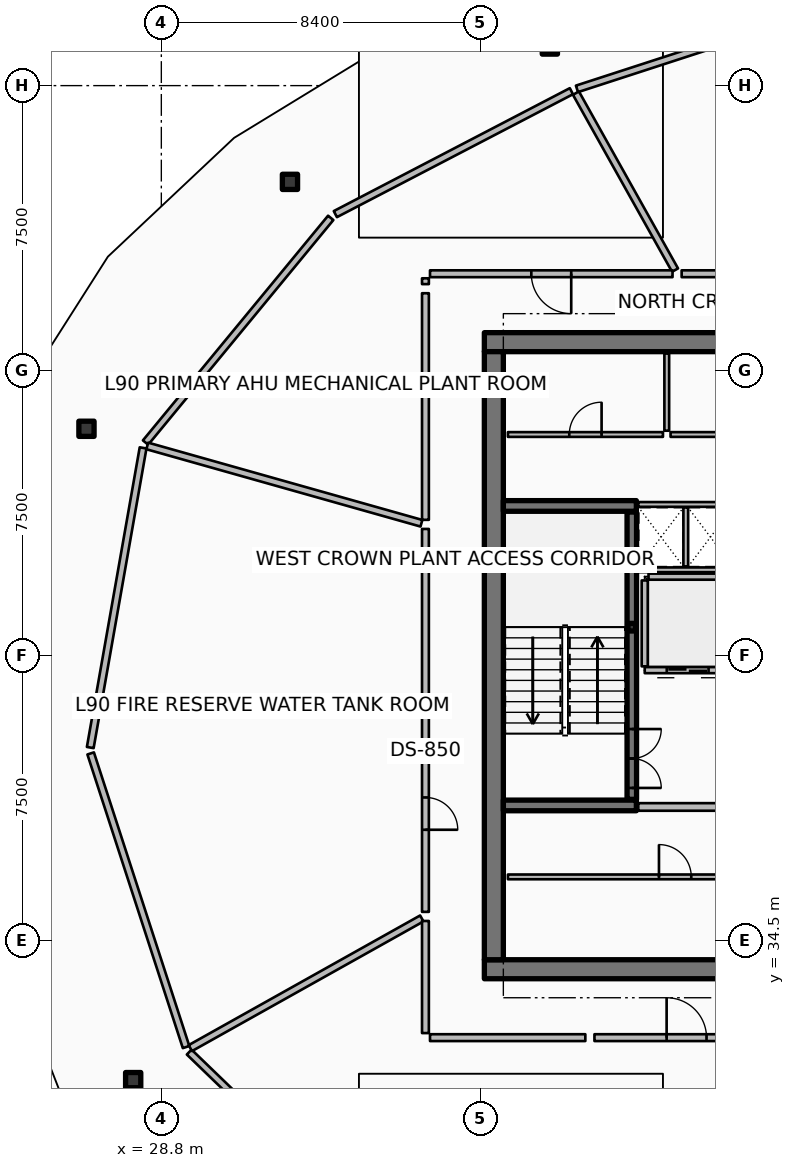
"""IFC4 building model, lengths in metres.
Left out: names, types, materials, properties, quantities, classifications, styles, units other than length and angle.
Written with IfcOpenShell. Run it as: python <this file> out.ifc"""

import sys

from ifc_helpers import new_model, si_unit, direction, frame, frame_2d, origin, origin_2d, place, context, subcontext, project, spatial, rectangle, hollow_rectangle, extrude, element, fill, save


model = new_model("IFC4")
c1 = context("Model", 3, precision=1e-05, world=origin(), true_north=direction((0.0, 1.0)))
c2 = subcontext(c1, "Body", "Model", "MODEL_VIEW")
j1 = project(units=[si_unit("LENGTHUNIT", "METRE"), si_unit("PLANEANGLEUNIT", "RADIAN")], contexts=[c1])
p1 = place(None, origin())
s1 = spatial("IfcSite", under=j1, at=p1, CompositionType="ELEMENT")
p2 = place(p1, origin())
s2 = spatial("IfcBuilding", under=s1, at=p2, CompositionType="ELEMENT")
p3 = place(p2, frame((0.0, 0.0, 359.6)))
s3 = spatial("IfcBuildingStorey", under=s2, at=p3, CompositionType="ELEMENT", Elevation=359.6)
for number, where, z_axis, x_axis in (
    (1, (37.3, 33.75, 0.0), (0.0, 0.0, 1.0), (1.0, 0.0, 0.0)),
    (2, (37.3, 50.25, 0.0), (0.0, 0.0, 1.0), (1.0, 0.0, 0.0)),
):
    element("IfcWall", number, at=place(p3, frame(where, z_axis=z_axis, x_axis=x_axis)), inside=s3, PredefinedType="SHEAR", context=c2, shape_type="SweptSolid", body=[
        extrude(rectangle(XDim=9.6, YDim=0.5, at=frame_2d((4.8, 0.0))), origin(), (0.0, 0.0, 1.0), 3.6),
    ])
p4 = place(p3, frame((37.55, 34.0, 0.0), z_axis=(0.0, 0.0, 1.0), x_axis=(0.0, 1.0, 0.0)))
e3 = element("IfcWall", 3, at=p4, inside=s3, PredefinedType="SHEAR", context=c2, shape_type="SweptSolid", body=[
    extrude(rectangle(XDim=16.0, YDim=0.5, at=frame_2d((8.0, 0.0))), origin(), (0.0, 0.0, 1.0), 3.6),
])
for number, where, z_axis, x_axis in (
    (4, (37.8, 38.06, 0.0), (0.0, 0.0, 1.0), (1.0, 0.0, 0.0)),
    (5, (37.8, 45.94, 0.0), (0.0, 0.0, 1.0), (1.0, 0.0, 0.0)),
):
    element("IfcWall", number, at=place(p3, frame(where, z_axis=z_axis, x_axis=x_axis)), inside=s3, PredefinedType="SHEAR", context=c2, shape_type="SweptSolid", body=[
        extrude(rectangle(XDim=3.5, YDim=0.28, at=frame_2d((1.75, 0.0))), origin(), (0.0, 0.0, 1.0), 3.6),
    ])
p5 = place(p3, frame((41.18, 42.75, 0.0), z_axis=(0.0, 0.0, 1.0), x_axis=(1.0, 0.0, 0.0)))
e6 = element("IfcColumn", 6, at=p5, inside=s3, PredefinedType="COLUMN", context=c2, shape_type="SweptSolid", body=[
    extrude(hollow_rectangle(XDim=0.2, YDim=0.2, WallThickness=0.01, InnerFilletRadius=0.01, OuterFilletRadius=0.02, at=origin_2d()), origin(), (0.0, 0.0, 1.0), 1.595),
])
for number, where, z_axis, x_axis in (
    (7, (39.023, 58.029, 0.0), (0.0, 0.0, 1.0), (1.0, 0.0, 0.0)),
    (8, (32.185, 54.468, 0.0), (0.0, 0.0, 1.0), (1.0, 0.0, 0.0)),
    (9, (26.83, 47.97, 0.0), (0.0, 0.0, 1.0), (1.0, 0.0, 0.0)),
    (10, (28.059, 30.833, 0.0), (0.0, 0.0, 1.0), (1.0, 0.0, 0.0)),
):
    element("IfcColumn", number, at=place(p3, frame(where, z_axis=z_axis, x_axis=x_axis)), inside=s3, PredefinedType="COLUMN", context=c2, shape_type="SweptSolid", body=[
        extrude(hollow_rectangle(XDim=0.4, YDim=0.4, WallThickness=0.02, InnerFilletRadius=0.02, OuterFilletRadius=0.04, at=origin_2d()), origin(), (0.0, 0.0, 1.0), 3.32),
    ])
p6 = place(p3, frame((41.18, 38.22, 0.0), z_axis=(0.0, 0.0, 1.0), x_axis=(0.0, 1.0, 0.0)))
e11 = element("IfcWall", 11, at=p6, inside=s3, PredefinedType="SOLIDWALL", context=c2, shape_type="SweptSolid", body=[
    extrude(rectangle(XDim=7.56, YDim=0.25, at=frame_2d((3.78, 0.0))), origin(), (0.0, 0.0, 1.0), 3.32),
])
p7 = place(p6, frame((0.3, 0.0, 0.0)))
e12 = element("IfcOpeningElement", 12, at=p7, cuts=e11, PredefinedType="OPENING", context=c2, shape_type="SweptSolid", body=[
    extrude(rectangle(XDim=1.55, YDim=2.15, at=frame_2d((0.775, 1.075))), frame((0.0, 0.135, 0.0), z_axis=(0.0, -1.0, 0.0), x_axis=(1.0, 0.0, 0.0)), (0.0, 0.0, 1.0), 0.27),
])
p8 = place(p3, frame((43.78, 41.62, 0.0), z_axis=(0.0, 0.0, 1.0), x_axis=(-1.0, 0.0, 0.0)))
e13 = element("IfcWall", 13, at=p8, inside=s3, PredefinedType="PARTITIONING", context=c2, shape_type="SweptSolid", body=[
    extrude(rectangle(XDim=2.26, YDim=0.16, at=frame_2d((1.13, 0.0))), origin(), (0.0, 0.0, 1.0), 3.32),
])
p9 = place(p8, frame((0.58, 0.0, 0.0)))
e14 = element("IfcOpeningElement", 14, at=p9, cuts=e13, PredefinedType="OPENING", context=c2, shape_type="SweptSolid", body=[
    extrude(rectangle(XDim=1.1, YDim=2.1, at=frame_2d((0.55, 1.05))), frame((0.0, 0.09, 0.0), z_axis=(0.0, -1.0, 0.0), x_axis=(1.0, 0.0, 0.0)), (0.0, 0.0, 1.0), 0.18),
])
p10 = place(p3, frame((41.52, 41.72, 0.0), z_axis=(0.0, 0.0, 1.0), x_axis=(0.0, 1.0, 0.0)))
e15 = element("IfcWall", 15, at=p10, inside=s3, PredefinedType="PARTITIONING", context=c2, shape_type="SweptSolid", body=[
    extrude(rectangle(XDim=2.26, YDim=0.16, at=frame_2d((1.13, 0.0))), origin(), (0.0, 0.0, 1.0), 3.32),
])
p11 = place(p3, frame((41.62, 44.08, 0.0), z_axis=(0.0, 0.0, 1.0), x_axis=(1.0, 0.0, 0.0)))
e16 = element("IfcWall", 16, at=p11, inside=s3, PredefinedType="PARTITIONING", context=c2, shape_type="SweptSolid", body=[
    extrude(rectangle(XDim=2.06, YDim=0.16, at=frame_2d((1.03, 0.0))), origin(), (0.0, 0.0, 1.0), 3.32),
])
p12 = place(p3, frame((37.92, 36.18, 0.0), z_axis=(0.0, 0.0, 1.0), x_axis=(1.0, 0.0, 0.0)))
e17 = element("IfcWall", 17, at=p12, inside=s3, PredefinedType="PARTITIONING", context=c2, shape_type="SweptSolid", body=[
    extrude(rectangle(XDim=8.8, YDim=0.125, at=frame_2d((4.4, 0.0))), origin(), (0.0, 0.0, 1.0), 2.76),
])
p13 = place(p12, frame((3.975, 0.0, 0.0)))
e18 = element("IfcOpeningElement", 18, at=p13, cuts=e17, PredefinedType="OPENING", context=c2, shape_type="SweptSolid", body=[
    extrude(rectangle(XDim=0.85, YDim=2.06, at=frame_2d((0.425, 1.03))), frame((0.0, 0.073, 0.0), z_axis=(0.0, -1.0, 0.0), x_axis=(1.0, 0.0, 0.0)), (0.0, 0.0, 1.0), 0.145),
])
p14 = place(p3, frame((42.1, 47.92, 0.0), z_axis=(0.0, 0.0, 1.0), x_axis=(0.0, 1.0, 0.0)))
e19 = element("IfcWall", 19, at=p14, inside=s3, PredefinedType="PARTITIONING", context=c2, shape_type="SweptSolid", body=[
    extrude(rectangle(XDim=2.03, YDim=0.125, at=frame_2d((1.015, 0.0))), origin(), (0.0, 0.0, 1.0), 2.76),
])
p15 = place(p3, frame((37.92, 47.82, 0.0), z_axis=(0.0, 0.0, 1.0), x_axis=(1.0, 0.0, 0.0)))
e20 = element("IfcWall", 20, at=p15, inside=s3, PredefinedType="PARTITIONING", context=c2, shape_type="SweptSolid", body=[
    extrude(rectangle(XDim=4.08, YDim=0.125, at=frame_2d((2.04, 0.0))), origin(), (0.0, 0.0, 1.0), 2.76),
])
p16 = place(p15, frame((1.615, 0.0, 0.0)))
e21 = element("IfcOpeningElement", 21, at=p16, cuts=e20, PredefinedType="OPENING", context=c2, shape_type="SweptSolid", body=[
    extrude(rectangle(XDim=0.85, YDim=2.06, at=frame_2d((0.425, 1.03))), frame((0.0, 0.073, 0.0), z_axis=(0.0, -1.0, 0.0), x_axis=(1.0, 0.0, 0.0)), (0.0, 0.0, 1.0), 0.145),
])
p17 = place(p3, frame((42.2, 47.82, 0.0), z_axis=(0.0, 0.0, 1.0), x_axis=(1.0, 0.0, 0.0)))
e22 = element("IfcWall", 22, at=p17, inside=s3, PredefinedType="PARTITIONING", context=c2, shape_type="SweptSolid", body=[
    extrude(rectangle(XDim=4.5, YDim=0.125, at=frame_2d((2.25, 0.0))), origin(), (0.0, 0.0, 1.0), 2.76),
])
p18 = place(p17, frame((1.825, 0.0, 0.0)))
e23 = element("IfcOpeningElement", 23, at=p18, cuts=e22, PredefinedType="OPENING", context=c2, shape_type="SweptSolid", body=[
    extrude(rectangle(XDim=0.85, YDim=2.06, at=frame_2d((0.425, 1.03))), frame((0.0, 0.073, 0.0), z_axis=(0.0, -1.0, 0.0), x_axis=(1.0, 0.0, 0.0)), (0.0, 0.0, 1.0), 0.145),
])
p19 = place(p3, frame((41.35, 38.02, 0.0), z_axis=(0.0, 0.0, 1.0), x_axis=(1.0, 0.0, 0.0)))
e24 = element("IfcWall", 24, at=p19, inside=s3, PredefinedType="PARTITIONING", context=c2, shape_type="SweptSolid", body=[
    extrude(rectangle(XDim=5.37, YDim=0.2, at=frame_2d((2.685, 0.0))), origin(), (0.0, 0.0, 1.0), 3.32),
])
p20 = place(p3, frame((41.36, 44.26, 0.0), z_axis=(0.0, 0.0, 1.0), x_axis=(1.0, 0.0, 0.0)))
e25 = element("IfcWall", 25, at=p20, inside=s3, PredefinedType="PARTITIONING", context=c2, shape_type="SweptSolid", body=[
    extrude(rectangle(XDim=2.5, YDim=0.125, at=frame_2d((1.25, 0.0))), origin(), (0.0, 0.0, 1.0), 2.76),
])
p21 = place(p3, frame((42.6, 44.35, 0.0), z_axis=(0.0, 0.0, 1.0), x_axis=(0.0, 1.0, 0.0)))
e26 = element("IfcWall", 26, at=p21, inside=s3, PredefinedType="PARTITIONING", context=c2, shape_type="SweptSolid", body=[
    extrude(rectangle(XDim=1.55, YDim=0.125, at=frame_2d((0.775, 0.0))), origin(), (0.0, 0.0, 1.0), 2.76),
])
p22 = place(p3, frame((41.35, 45.98, 0.0), z_axis=(0.0, 0.0, 1.0), x_axis=(1.0, 0.0, 0.0)))
e27 = element("IfcWall", 27, at=p22, inside=s3, PredefinedType="PARTITIONING", context=c2, shape_type="SweptSolid", body=[
    extrude(rectangle(XDim=2.53, YDim=0.125, at=frame_2d((1.265, 0.0))), origin(), (0.0, 0.0, 1.0), 2.76),
])
p23 = place(p3, frame((45.918, 58.923, 0.0), z_axis=(0.0, 0.0, 1.0), x_axis=(-0.95105283999, -0.309028308649, 0.0)))
e28 = element("IfcWall", 28, at=p23, inside=s3, PredefinedType="PARTITIONING", context=c2, shape_type="SweptSolid", body=[
    extrude(rectangle(XDim=6.499, YDim=0.18, at=frame_2d((3.25, 0.0))), origin(), (0.0, 0.0, 1.0), 2.76),
])
p24 = place(p3, frame((39.59, 56.853, 0.0), z_axis=(0.0, 0.0, 1.0), x_axis=(-0.886949494865, -0.461866423935, 0.0)))
e29 = element("IfcWall", 29, at=p24, inside=s3, PredefinedType="PARTITIONING", context=c2, shape_type="SweptSolid", body=[
    extrude(rectangle(XDim=7.002, YDim=0.18, at=frame_2d((3.501, 0.0))), origin(), (0.0, 0.0, 1.0), 2.76),
])
p25 = place(p3, frame((33.258, 53.52, 0.0), z_axis=(0.0, 0.0, 1.0), x_axis=(-0.636018833443, -0.771673534278, 0.0)))
e30 = element("IfcWall", 30, at=p25, inside=s3, PredefinedType="PARTITIONING", context=c2, shape_type="SweptSolid", body=[
    extrude(rectangle(XDim=7.661, YDim=0.18, at=frame_2d((3.831, 0.0))), origin(), (0.0, 0.0, 1.0), 2.76),
])
p26 = place(p3, frame((28.32, 47.468, 0.0), z_axis=(0.0, 0.0, 1.0), x_axis=(-0.173668776466, -0.984804120666, 0.0)))
e31 = element("IfcWall", 31, at=p26, inside=s3, PredefinedType="PARTITIONING", context=c2, shape_type="SweptSolid", body=[
    extrude(rectangle(XDim=8.006, YDim=0.18, at=frame_2d((4.003, 0.0))), origin(), (0.0, 0.0, 1.0), 2.76),
])
p27 = place(p3, frame((26.941, 39.428, 0.0), z_axis=(0.0, 0.0, 1.0), x_axis=(0.309024234991, -0.951054163646, 0.0)))
e32 = element("IfcWall", 32, at=p27, inside=s3, PredefinedType="PARTITIONING", context=c2, shape_type="SweptSolid", body=[
    extrude(rectangle(XDim=8.124, YDim=0.18, at=frame_2d((4.062, 0.0))), origin(), (0.0, 0.0, 1.0), 2.76),
])
p28 = place(p3, frame((29.533, 31.57, 0.0), z_axis=(0.0, 0.0, 1.0), x_axis=(0.719364153135, -0.694633151516, 0.0)))
e33 = element("IfcWall", 33, at=p28, inside=s3, PredefinedType="PARTITIONING", context=c2, shape_type="SweptSolid", body=[
    extrude(rectangle(XDim=8.006, YDim=0.18, at=frame_2d((4.003, 0.0))), origin(), (0.0, 0.0, 1.0), 2.76),
])
p29 = place(p3, frame((46.69, 52.05, 0.0), z_axis=(0.0, 0.0, 1.0), x_axis=(-1.0, 0.0, 0.0)))
e34 = element("IfcWall", 34, at=p29, inside=s3, PredefinedType="PARTITIONING", context=c2, shape_type="SweptSolid", body=[
    extrude(rectangle(XDim=4.199, YDim=0.18, at=frame_2d((2.099, 0.0))), origin(), (0.0, 0.0, 1.0), 2.76),
])
p30 = place(p3, frame((42.318, 52.146, 0.0), z_axis=(0.0, 0.0, 1.0), x_axis=(-0.488622869326, 0.872495095443, 0.0)))
e35 = element("IfcWall", 35, at=p30, inside=s3, PredefinedType="PARTITIONING", context=c2, shape_type="SweptSolid", body=[
    extrude(rectangle(XDim=5.337, YDim=0.18, at=frame_2d((2.668, 0.0))), origin(), (0.0, 0.0, 1.0), 2.76),
])
p31 = place(p3, frame((42.252, 52.05, 0.0), z_axis=(0.0, 0.0, 1.0), x_axis=(-1.0, 0.0, 0.0)))
e36 = element("IfcWall", 36, at=p31, inside=s3, PredefinedType="PARTITIONING", context=c2, shape_type="SweptSolid", body=[
    extrude(rectangle(XDim=6.382, YDim=0.18, at=frame_2d((3.191, 0.0))), origin(), (0.0, 0.0, 1.0), 2.76),
])
p32 = place(p31, frame((2.666, 0.0, 0.0)))
e37 = element("IfcOpeningElement", 37, at=p32, cuts=e36, PredefinedType="OPENING", context=c2, shape_type="SweptSolid", body=[
    extrude(rectangle(XDim=1.05, YDim=2.1, at=frame_2d((0.525, 1.05))), frame((0.0, 0.1, 0.0), z_axis=(0.0, -1.0, 0.0), x_axis=(1.0, 0.0, 0.0)), (0.0, 0.0, 1.0), 0.2),
])
p33 = place(p3, frame((35.75, 51.93, 0.0), z_axis=(0.0, 0.0, 1.0), x_axis=(0.0, -1.0, 0.0)))
e38 = element("IfcWall", 38, at=p33, inside=s3, PredefinedType="PARTITIONING", context=c2, shape_type="SweptSolid", body=[
    extrude(rectangle(XDim=0.153, YDim=0.18, at=frame_2d((0.076, 0.0))), origin(), (0.0, 0.0, 1.0), 2.76),
])
p34 = place(p3, frame((35.75, 51.537, 0.0), z_axis=(0.0, 0.0, 1.0), x_axis=(0.0, -1.0, 0.0)))
e39 = element("IfcWall", 39, at=p34, inside=s3, PredefinedType="PARTITIONING", context=c2, shape_type="SweptSolid", body=[
    extrude(rectangle(XDim=5.962, YDim=0.18, at=frame_2d((2.981, 0.0))), origin(), (0.0, 0.0, 1.0), 2.76),
])
p35 = place(p3, frame((35.644, 45.485, 0.0), z_axis=(0.0, 0.0, 1.0), x_axis=(-0.96245862205, 0.271428445159, 0.0)))
e40 = element("IfcWall", 40, at=p35, inside=s3, PredefinedType="PARTITIONING", context=c2, shape_type="SweptSolid", body=[
    extrude(rectangle(XDim=7.495, YDim=0.18, at=frame_2d((3.748, 0.0))), origin(), (0.0, 0.0, 1.0), 2.76),
])
p36 = place(p3, frame((35.75, 45.335, 0.0), z_axis=(0.0, 0.0, 1.0), x_axis=(0.0, -1.0, 0.0)))
e41 = element("IfcWall", 41, at=p36, inside=s3, PredefinedType="PARTITIONING", context=c2, shape_type="SweptSolid", body=[
    extrude(rectangle(XDim=4.665, YDim=0.18, at=frame_2d((2.333, 0.0))), origin(), (0.0, 0.0, 1.0), 2.76),
])
p37 = place(p3, frame((35.75, 40.43, 0.0), z_axis=(0.0, 0.0, 1.0), x_axis=(0.0, -1.0, 0.0)))
e42 = element("IfcWall", 42, at=p37, inside=s3, PredefinedType="PARTITIONING", context=c2, shape_type="SweptSolid", body=[
    extrude(rectangle(XDim=5.17, YDim=0.18, at=frame_2d((2.585, 0.0))), origin(), (0.0, 0.0, 1.0), 2.76),
])
p38 = place(p37, frame((2.16, 0.0, 0.0)))
e43 = element("IfcOpeningElement", 43, at=p38, cuts=e42, PredefinedType="OPENING", context=c2, shape_type="SweptSolid", body=[
    extrude(rectangle(XDim=0.85, YDim=2.06, at=frame_2d((0.425, 1.03))), frame((0.0, 0.1, 0.0), z_axis=(0.0, -1.0, 0.0), x_axis=(1.0, 0.0, 0.0)), (0.0, 0.0, 1.0), 0.2),
])
p39 = place(p3, frame((35.654, 35.086, 0.0), z_axis=(0.0, 0.0, 1.0), x_axis=(-0.872497667023, -0.488618277432, 0.0)))
e44 = element("IfcWall", 44, at=p39, inside=s3, PredefinedType="PARTITIONING", context=c2, shape_type="SweptSolid", body=[
    extrude(rectangle(XDim=6.981, YDim=0.18, at=frame_2d((3.491, 0.0))), origin(), (0.0, 0.0, 1.0), 2.76),
])
p40 = place(p3, frame((35.75, 35.02, 0.0), z_axis=(0.0, 0.0, 1.0), x_axis=(0.0, -1.0, 0.0)))
e45 = element("IfcWall", 45, at=p40, inside=s3, PredefinedType="PARTITIONING", context=c2, shape_type="SweptSolid", body=[
    extrude(rectangle(XDim=2.95, YDim=0.18, at=frame_2d((1.475, 0.0))), origin(), (0.0, 0.0, 1.0), 2.76),
])
p41 = place(p3, frame((35.87, 31.95, 0.0), z_axis=(0.0, 0.0, 1.0), x_axis=(1.0, 0.0, 0.0)))
e46 = element("IfcWall", 46, at=p41, inside=s3, PredefinedType="PARTITIONING", context=c2, shape_type="SweptSolid", body=[
    extrude(rectangle(XDim=4.087, YDim=0.18, at=frame_2d((2.043, 0.0))), origin(), (0.0, 0.0, 1.0), 2.76),
])
p42 = place(p3, frame((40.197, 31.95, 0.0), z_axis=(0.0, 0.0, 1.0), x_axis=(1.0, 0.0, 0.0)))
e47 = element("IfcWall", 47, at=p42, inside=s3, PredefinedType="PARTITIONING", context=c2, shape_type="SweptSolid", body=[
    extrude(rectangle(XDim=4.848, YDim=0.18, at=frame_2d((2.424, 0.0))), origin(), (0.0, 0.0, 1.0), 2.76),
])
p43 = place(p42, frame((1.899, 0.0, 0.0)))
e48 = element("IfcOpeningElement", 48, at=p43, cuts=e47, PredefinedType="OPENING", context=c2, shape_type="SweptSolid", body=[
    extrude(rectangle(XDim=1.05, YDim=2.1, at=frame_2d((0.525, 1.05))), frame((0.0, 0.1, 0.0), z_axis=(0.0, -1.0, 0.0), x_axis=(1.0, 0.0, 0.0)), (0.0, 0.0, 1.0), 0.2),
])
p44 = place(p7, origin())
e49 = element("IfcDoor", 49, at=p44, inside=s3, OperationType="DOUBLE_DOOR_SINGLE_SWING", PredefinedType="DOOR", context=c2, shape_type="SweptSolid", body=[
    extrude(rectangle(XDim=1.55, YDim=2.15, at=frame_2d((0.775, 1.075))), frame((0.0, 0.025, 0.0), z_axis=(0.0, -1.0, 0.0), x_axis=(1.0, 0.0, 0.0)), (0.0, 0.0, 1.0), 0.05),
])
fill(e12, e49)
p45 = place(p9, origin())
e50 = element("IfcDoor", 50, at=p45, inside=s3, OperationType="DOUBLE_DOOR_SLIDING", PredefinedType="DOOR", context=c2, shape_type="SweptSolid", body=[
    extrude(rectangle(XDim=1.1, YDim=2.1, at=frame_2d((0.55, 1.05))), frame((0.0, 0.025, 0.0), z_axis=(0.0, -1.0, 0.0), x_axis=(1.0, 0.0, 0.0)), (0.0, 0.0, 1.0), 0.05),
])
fill(e14, e50)
p46 = place(p13, origin())
e51 = element("IfcDoor", 51, at=p46, inside=s3, OperationType="SINGLE_SWING_LEFT", PredefinedType="DOOR", context=c2, shape_type="SweptSolid", body=[
    extrude(rectangle(XDim=0.85, YDim=2.06, at=frame_2d((0.425, 1.03))), frame((0.0, 0.025, 0.0), z_axis=(0.0, -1.0, 0.0), x_axis=(1.0, 0.0, 0.0)), (0.0, 0.0, 1.0), 0.05),
])
fill(e18, e51)
p47 = place(p16, origin())
e52 = element("IfcDoor", 52, at=p47, inside=s3, OperationType="SINGLE_SWING_RIGHT", PredefinedType="DOOR", context=c2, shape_type="SweptSolid", body=[
    extrude(rectangle(XDim=0.85, YDim=2.06, at=frame_2d((0.425, 1.03))), frame((0.0, 0.025, 0.0), z_axis=(0.0, -1.0, 0.0), x_axis=(1.0, 0.0, 0.0)), (0.0, 0.0, 1.0), 0.05),
])
fill(e21, e52)
p48 = place(p32, origin())
e53 = element("IfcDoor", 53, at=p48, inside=s3, OperationType="SINGLE_SWING_LEFT", PredefinedType="DOOR", context=c2, shape_type="SweptSolid", body=[
    extrude(rectangle(XDim=1.05, YDim=2.1, at=frame_2d((0.525, 1.05))), frame((0.0, 0.025, 0.0), z_axis=(0.0, -1.0, 0.0), x_axis=(1.0, 0.0, 0.0)), (0.0, 0.0, 1.0), 0.05),
])
fill(e37, e53)
p49 = place(p38, origin())
e54 = element("IfcDoor", 54, at=p49, inside=s3, OperationType="SINGLE_SWING_RIGHT", PredefinedType="DOOR", context=c2, shape_type="SweptSolid", body=[
    extrude(rectangle(XDim=0.85, YDim=2.06, at=frame_2d((0.425, 1.03))), frame((0.0, 0.025, 0.0), z_axis=(0.0, -1.0, 0.0), x_axis=(1.0, 0.0, 0.0)), (0.0, 0.0, 1.0), 0.05),
])
fill(e43, e54)
p50 = place(p43, origin())
e55 = element("IfcDoor", 55, at=p50, inside=s3, OperationType="SINGLE_SWING_LEFT", PredefinedType="DOOR", context=c2, shape_type="SweptSolid", body=[
    extrude(rectangle(XDim=1.05, YDim=2.1, at=frame_2d((0.525, 1.05))), frame((0.0, 0.025, 0.0), z_axis=(0.0, -1.0, 0.0), x_axis=(1.0, 0.0, 0.0)), (0.0, 0.0, 1.0), 0.05),
])
fill(e48, e55)
save(model, sys.argv[1])
